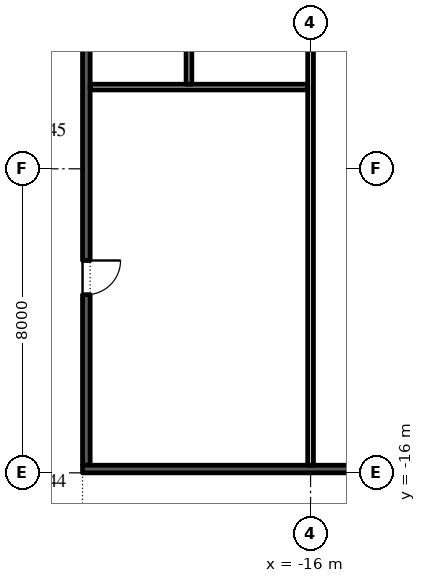
"""IFC4 building model, lengths in metres.
Left out: names, types, materials, properties, quantities, classifications, styles, units other than length and angle.
Written with IfcOpenShell. Run it as: python <this file> out.ifc"""

import sys

from ifc_helpers import new_model, si_unit, direction, frame, frame_2d, origin, place, context, subcontext, project, spatial, rectangle, extrude, element, fill, save


model = new_model("IFC4")
c1 = context("Model", 3, precision=1e-05, world=origin(), true_north=direction((0.0, 1.0)))
c2 = subcontext(c1, "Body", "Model", "MODEL_VIEW")
j1 = project(units=[si_unit("LENGTHUNIT", "METRE"), si_unit("PLANEANGLEUNIT", "RADIAN")], contexts=[c1])
p1 = place(None, origin())
s1 = spatial("IfcSite", under=j1, at=p1, CompositionType="ELEMENT")
p2 = place(p1, origin())
s2 = spatial("IfcBuilding", under=s1, at=p2, CompositionType="ELEMENT")
p3 = place(p2, frame((0.0, 0.0, 19.2)))
s3 = spatial("IfcBuildingStorey", under=s2, at=p3, CompositionType="ELEMENT", Elevation=19.2)
p4 = place(p3, frame((-21.9, -15.8, 0.0), z_axis=(0.0, 0.0, 1.0), x_axis=(0.0, 1.0, 0.0)))
e1 = element("IfcWall", 1, at=p4, inside=s3, PredefinedType="SHEAR", context=c2, shape_type="SweptSolid", body=[
    extrude(rectangle(XDim=13.05, YDim=0.2, at=frame_2d((6.525, 0.0))), origin(), (0.0, 0.0, 1.0), 4.5),
])
p5 = place(p4, frame((4.488, 0.0, 0.0)))
e2 = element("IfcOpeningElement", 2, at=p5, cuts=e1, PredefinedType="OPENING", context=c2, shape_type="SweptSolid", body=[
    extrude(rectangle(XDim=0.9, YDim=2.1, at=frame_2d((0.45, 1.05))), frame((0.0, 0.11, 0.0), z_axis=(0.0, -1.0, 0.0), x_axis=(1.0, 0.0, 0.0)), (0.0, 0.0, 1.0), 0.22),
])
p6 = place(p4, frame((11.038, 0.0, 0.0)))
e3 = element("IfcOpeningElement", 3, at=p6, cuts=e1, PredefinedType="OPENING", context=c2, shape_type="SweptSolid", body=[
    extrude(rectangle(XDim=1.0, YDim=2.1, at=frame_2d((0.5, 1.05))), frame((0.0, 0.11, 0.0), z_axis=(0.0, -1.0, 0.0), x_axis=(1.0, 0.0, 0.0)), (0.0, 0.0, 1.0), 0.22),
])
p7 = place(p3, frame((-22.0, -15.9, 0.0), z_axis=(0.0, 0.0, 1.0), x_axis=(1.0, 0.0, 0.0)))
e4 = element("IfcWall", 4, at=p7, inside=s3, PredefinedType="SHEAR", context=c2, shape_type="SweptSolid", body=[
    extrude(rectangle(XDim=12.0, YDim=0.2, at=frame_2d((6.0, 0.0))), origin(), (0.0, 0.0, 1.0), 4.5),
])
p8 = place(p3, frame((-16.0, -15.8, 0.0), z_axis=(0.0, 0.0, 1.0), x_axis=(0.0, 1.0, 0.0)))
e5 = element("IfcWall", 5, at=p8, inside=s3, PredefinedType="PARTITIONING", context=c2, shape_type="SweptSolid", body=[
    extrude(rectangle(XDim=13.05, YDim=0.15, at=frame_2d((6.525, 0.0))), origin(), (0.0, 0.0, 1.0), 4.5),
])
p9 = place(p8, frame((11.087, 0.0, 0.0)))
e6 = element("IfcOpeningElement", 6, at=p9, cuts=e5, PredefinedType="OPENING", context=c2, shape_type="SweptSolid", body=[
    extrude(rectangle(XDim=0.9, YDim=2.1, at=frame_2d((0.45, 1.05))), frame((0.0, 0.085, 0.0), z_axis=(0.0, -1.0, 0.0), x_axis=(1.0, 0.0, 0.0)), (0.0, 0.0, 1.0), 0.17),
])
p10 = place(p3, frame((-21.8, -5.85, 0.0), z_axis=(0.0, 0.0, 1.0), x_axis=(1.0, 0.0, 0.0)))
e7 = element("IfcWall", 7, at=p10, inside=s3, PredefinedType="PARTITIONING", context=c2, shape_type="SweptSolid", body=[
    extrude(rectangle(XDim=5.725, YDim=0.15, at=frame_2d((2.863, 0.0))), origin(), (0.0, 0.0, 1.0), 4.5),
])
p11 = place(p3, frame((-19.2, -5.775, 0.0), z_axis=(0.0, 0.0, 1.0), x_axis=(0.0, 1.0, 0.0)))
e8 = element("IfcWall", 8, at=p11, inside=s3, PredefinedType="PARTITIONING", context=c2, shape_type="SweptSolid", body=[
    extrude(rectangle(XDim=3.025, YDim=0.15, at=frame_2d((1.512, 0.0))), origin(), (0.0, 0.0, 1.0), 4.5),
])
p12 = place(p5, frame((0.9, -0.15, 0.0), z_axis=(0.0, 0.0, 1.0), x_axis=(-1.0, 0.0, 0.0)))
e9 = element("IfcDoor", 9, at=p12, inside=s3, OperationType="SINGLE_SWING_RIGHT", PredefinedType="DOOR", context=c2, shape_type="SweptSolid", body=[
    extrude(rectangle(XDim=0.9, YDim=2.1, at=frame_2d((0.45, 1.05))), frame((0.0, -0.05, 0.0), z_axis=(0.0, -1.0, 0.0), x_axis=(1.0, 0.0, 0.0)), (0.0, 0.0, 1.0), 0.05),
])
fill(e2, e9)
save(model, sys.argv[1])
